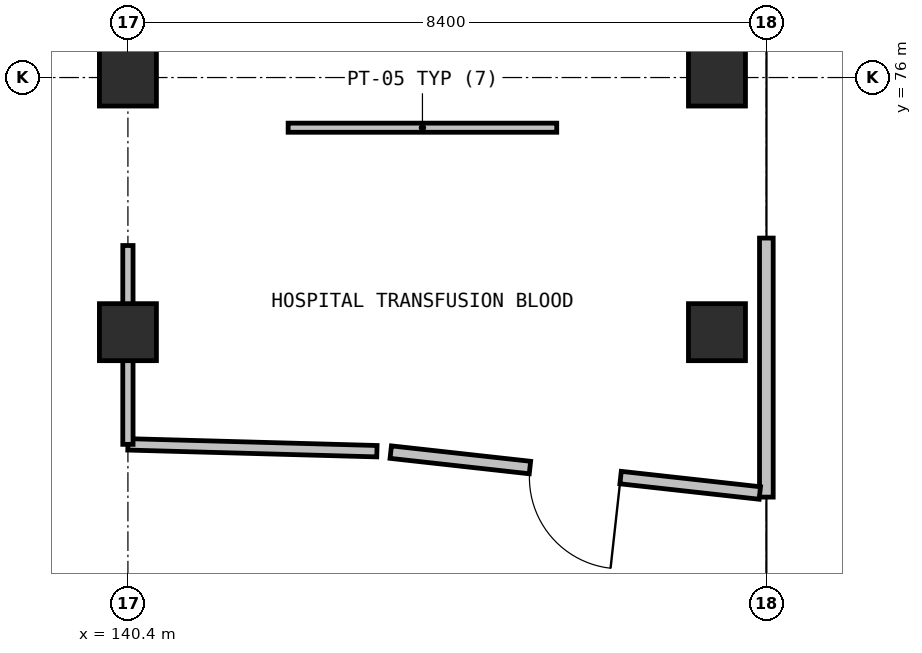
"""IFC4 building model, lengths in metres.
Left out: names, types, materials, properties, quantities, classifications, styles, units other than length and angle.
Written with IfcOpenShell. Run it as: python <this file> out.ifc"""

import sys

from ifc_helpers import new_model, si_unit, direction, frame, frame_2d, origin, origin_2d, place, context, subcontext, project, spatial, rectangle, extrude, element, fill, save


model = new_model("IFC4")
c1 = context("Model", 3, precision=1e-05, world=origin(), true_north=direction((0.0, 1.0)))
c2 = subcontext(c1, "Body", "Model", "MODEL_VIEW")
j1 = project(units=[si_unit("LENGTHUNIT", "METRE"), si_unit("PLANEANGLEUNIT", "RADIAN")], contexts=[c1])
p1 = place(None, origin())
s1 = spatial("IfcSite", under=j1, at=p1, CompositionType="ELEMENT")
p2 = place(p1, origin())
s2 = spatial("IfcBuilding", under=s1, at=p2, CompositionType="ELEMENT")
p3 = place(p2, frame((0.0, 0.0, 15.0)))
s3 = spatial("IfcBuildingStorey", under=s2, at=p3, CompositionType="ELEMENT", Elevation=15.0)
for number, where, z_axis, x_axis in (
    (1, (140.4, 72.65, 0.0), (0.0, 0.0, 1.0), (1.0, 0.0, 0.0)),
    (2, (140.4, 76.0, 0.0), (0.0, 0.0, 1.0), (1.0, 0.0, 0.0)),
    (3, (148.15, 72.65, 0.0), (0.0, 0.0, 1.0), (1.0, 0.0, 0.0)),
    (4, (148.15, 76.0, 0.0), (0.0, 0.0, 1.0), (1.0, 0.0, 0.0)),
):
    element("IfcColumn", number, at=place(p3, frame(where, z_axis=z_axis, x_axis=x_axis)), inside=s3, PredefinedType="COLUMN", context=c2, shape_type="SweptSolid", body=[
        extrude(rectangle(XDim=0.75, YDim=0.75, at=origin_2d()), origin(), (0.0, 0.0, 1.0), 4.2),
    ])
p4 = place(p3, frame((142.508, 75.34, 0.0), z_axis=(0.0, 0.0, 1.0), x_axis=(1.0, 0.0, 0.0)))
e5 = element("IfcWall", 5, at=p4, inside=s3, PredefinedType="PARTITIONING", context=c2, shape_type="SweptSolid", body=[
    extrude(rectangle(XDim=3.534, YDim=0.12, at=frame_2d((1.767, 0.0))), origin(), (0.0, 0.0, 1.0), 3.895),
])
p5 = place(p3, frame((148.8, 73.888, 0.0), z_axis=(0.0, 0.0, 1.0), x_axis=(0.0, -1.0, 0.0)))
e6 = element("IfcWall", 6, at=p5, inside=s3, PredefinedType="PARTITIONING", context=c2, shape_type="SweptSolid", body=[
    extrude(rectangle(XDim=3.408, YDim=0.18, at=frame_2d((1.704, 0.0))), origin(), (0.0, 0.0, 1.0), 3.895),
])
p6 = place(p3, frame((148.714, 70.534, 0.0), z_axis=(0.0, 0.0, 1.0), x_axis=(-0.993917204148, 0.110129883764, 0.0)))
e7 = element("IfcWall", 7, at=p6, inside=s3, PredefinedType="PARTITIONING", context=c2, shape_type="SweptSolid", body=[
    extrude(rectangle(XDim=4.886, YDim=0.165, at=frame_2d((2.443, 0.0))), origin(), (0.0, 0.0, 1.0), 3.895),
])
p7 = place(p6, frame((1.843, 0.0, 0.0)))
e8 = element("IfcOpeningElement", 8, at=p7, cuts=e7, PredefinedType="OPENING", context=c2, shape_type="SweptSolid", body=[
    extrude(rectangle(XDim=1.2, YDim=2.15, at=frame_2d((0.6, 1.075))), frame((0.0, 0.093, 0.0), z_axis=(0.0, -1.0, 0.0), x_axis=(1.0, 0.0, 0.0)), (0.0, 0.0, 1.0), 0.185),
])
p8 = place(p3, frame((143.676, 71.084, 0.0), z_axis=(0.0, 0.0, 1.0), x_axis=(-0.999622135389, 0.02748793263, 0.0)))
e9 = element("IfcWall", 9, at=p8, inside=s3, PredefinedType="PARTITIONING", context=c2, shape_type="SweptSolid", body=[
    extrude(rectangle(XDim=3.277, YDim=0.15, at=frame_2d((1.639, 0.0))), origin(), (0.0, 0.0, 1.0), 3.895),
])
p9 = place(p3, frame((140.4, 71.174, 0.0), z_axis=(0.0, 0.0, 1.0), x_axis=(0.0, 1.0, 0.0)))
e10 = element("IfcWall", 10, at=p9, inside=s3, PredefinedType="PARTITIONING", context=c2, shape_type="SweptSolid", body=[
    extrude(rectangle(XDim=2.616, YDim=0.135, at=frame_2d((1.308, 0.0))), origin(), (0.0, 0.0, 1.0), 3.245),
])
p10 = place(p7, origin())
e11 = element("IfcDoor", 11, at=p10, inside=s3, OperationType="SINGLE_SWING_LEFT", PredefinedType="DOOR", context=c2, shape_type="SweptSolid", body=[
    extrude(rectangle(XDim=1.2, YDim=2.15, at=frame_2d((0.6, 1.075))), frame((0.0, 0.025, 0.0), z_axis=(0.0, -1.0, 0.0), x_axis=(1.0, 0.0, 0.0)), (0.0, 0.0, 1.0), 0.05),
])
fill(e8, e11)
save(model, sys.argv[1])
